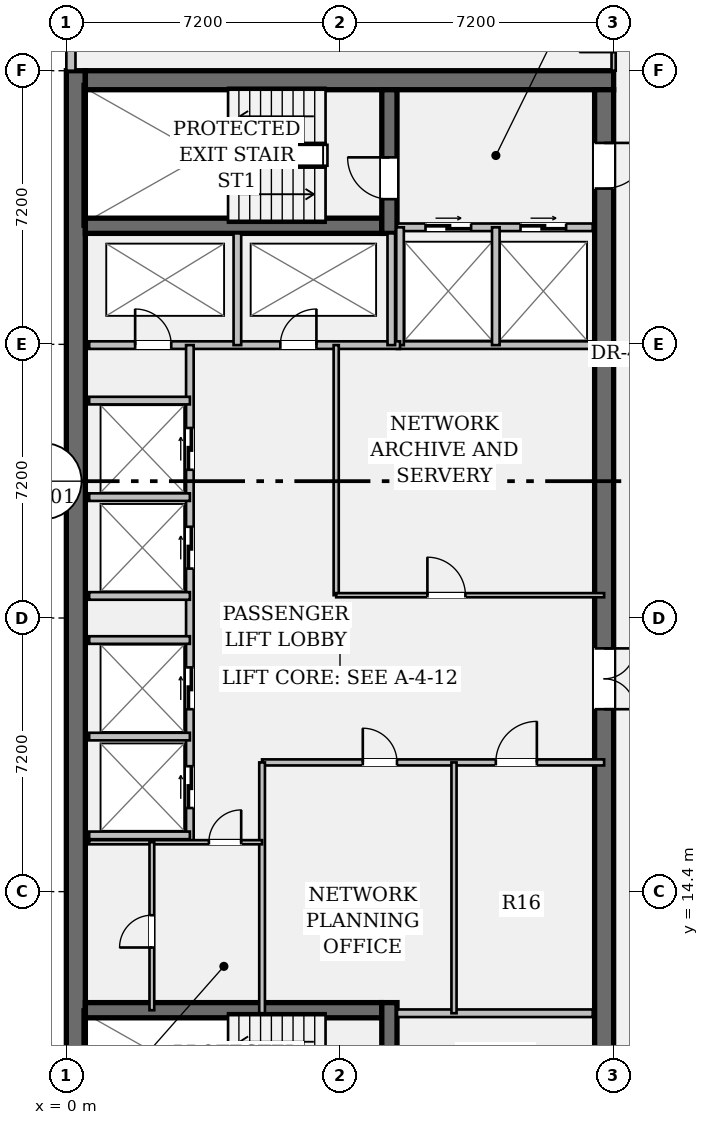
"""IFC4 building model, lengths in metres.
Left out: names, types, materials, properties, quantities, classifications, styles, units other than length and angle.
Written with IfcOpenShell. Run it as: python <this file> out.ifc"""

import sys

from ifc_helpers import new_model, si_unit, direction, frame, frame_2d, origin, place, context, subcontext, project, spatial, rectangle, extrude, element, fill, save


model = new_model("IFC4")
c1 = context("Model", 3, precision=1e-05, world=origin(), true_north=direction((0.0, 1.0)))
c2 = subcontext(c1, "Body", "Model", "MODEL_VIEW")
j1 = project(units=[si_unit("LENGTHUNIT", "METRE"), si_unit("PLANEANGLEUNIT", "RADIAN")], contexts=[c1])
p1 = place(None, origin())
s1 = spatial("IfcSite", under=j1, at=p1, CompositionType="ELEMENT")
p2 = place(p1, origin())
s2 = spatial("IfcBuilding", under=s1, at=p2, CompositionType="ELEMENT")
p3 = place(p2, frame((0.0, 0.0, 180.25)))
s3 = spatial("IfcBuildingStorey", under=s2, at=p3, CompositionType="ELEMENT", Elevation=180.25)
p4 = place(p3, frame((0.25, 7.2, 0.0), z_axis=(0.0, 0.0, 1.0), x_axis=(0.0, 1.0, 0.0)))
e1 = element("IfcWall", 1, at=p4, inside=s3, PredefinedType="SHEAR", context=c2, shape_type="SweptSolid", body=[
    extrude(rectangle(XDim=28.8, YDim=0.5, at=frame_2d((14.4, 0.0))), origin(), (0.0, 0.0, 1.0), 3.24),
])
p5 = place(p3, frame((0.5, 35.75, 0.0), z_axis=(0.0, 0.0, 1.0), x_axis=(1.0, 0.0, 0.0)))
e2 = element("IfcWall", 2, at=p5, inside=s3, PredefinedType="SHEAR", context=c2, shape_type="SweptSolid", body=[
    extrude(rectangle(XDim=13.9, YDim=0.5, at=frame_2d((6.95, 0.0))), origin(), (0.0, 0.0, 1.0), 3.24),
])
p6 = place(p3, frame((14.15, 35.5, 0.0), z_axis=(0.0, 0.0, 1.0), x_axis=(0.0, -1.0, 0.0)))
e3 = element("IfcWall", 3, at=p6, inside=s3, PredefinedType="SHEAR", context=c2, shape_type="SweptSolid", body=[
    extrude(rectangle(XDim=27.8, YDim=0.5, at=frame_2d((13.9, 0.0))), origin(), (0.0, 0.0, 1.0), 3.24),
])
p7 = place(p6, frame((1.4, 0.0, 0.0)))
e4 = element("IfcOpeningElement", 4, at=p7, cuts=e3, PredefinedType="OPENING", context=c2, shape_type="SweptSolid", body=[
    extrude(rectangle(XDim=1.2, YDim=2.15, at=frame_2d((0.6, 1.075))), frame((0.0, 0.262, 0.0), z_axis=(0.0, -1.0, 0.0), x_axis=(1.0, 0.0, 0.0)), (0.0, 0.0, 1.0), 0.524),
])
p8 = place(p6, frame((25.35, 0.0, 0.0)))
e5 = element("IfcOpeningElement", 5, at=p8, cuts=e3, PredefinedType="OPENING", context=c2, shape_type="SweptSolid", body=[
    extrude(rectangle(XDim=1.2, YDim=2.15, at=frame_2d((0.6, 1.075))), frame((0.0, 0.262, 0.0), z_axis=(0.0, -1.0, 0.0), x_axis=(1.0, 0.0, 0.0)), (0.0, 0.0, 1.0), 0.524),
])
p9 = place(p6, frame((14.7, 0.0, 0.0)))
e6 = element("IfcOpeningElement", 6, at=p9, cuts=e3, PredefinedType="OPENING", context=c2, shape_type="SweptSolid", body=[
    extrude(rectangle(XDim=1.6, YDim=2.2, at=frame_2d((0.8, 1.1))), frame((0.0, 0.262, 0.0), z_axis=(0.0, -1.0, 0.0), x_axis=(1.0, 0.0, 0.0)), (0.0, 0.0, 1.0), 0.524),
])
for number, where, z_axis, x_axis in (
    (7, (0.5, 31.92, 0.0), (0.0, 0.0, 1.0), (1.0, 0.0, 0.0)),
    (8, (0.5, 11.28, 0.0), (0.0, 0.0, 1.0), (1.0, 0.0, 0.0)),
):
    element("IfcWall", number, at=place(p3, frame(where, z_axis=z_axis, x_axis=x_axis)), inside=s3, PredefinedType="SHEAR", context=c2, shape_type="SweptSolid", body=[
        extrude(rectangle(XDim=7.8, YDim=0.4, at=frame_2d((3.9, 0.0))), origin(), (0.0, 0.0, 1.0), 3.24),
    ])
p10 = place(p3, frame((8.5, 31.72, 0.0), z_axis=(0.0, 0.0, 1.0), x_axis=(0.0, 1.0, 0.0)))
e9 = element("IfcWall", 9, at=p10, inside=s3, PredefinedType="SHEAR", context=c2, shape_type="SweptSolid", body=[
    extrude(rectangle(XDim=3.78, YDim=0.4, at=frame_2d((1.89, 0.0))), origin(), (0.0, 0.0, 1.0), 3.24),
])
p11 = place(p10, frame((0.9, 0.0, 0.0)))
e10 = element("IfcOpeningElement", 10, at=p11, cuts=e9, PredefinedType="OPENING", context=c2, shape_type="SweptSolid", body=[
    extrude(rectangle(XDim=1.1, YDim=2.15, at=frame_2d((0.55, 1.075))), frame((0.0, 0.212, 0.0), z_axis=(0.0, -1.0, 0.0), x_axis=(1.0, 0.0, 0.0)), (0.0, 0.0, 1.0), 0.424),
])
p12 = place(p3, frame((8.5, 7.7, 0.0), z_axis=(0.0, 0.0, 1.0), x_axis=(0.0, 1.0, 0.0)))
e11 = element("IfcWall", 11, at=p12, inside=s3, PredefinedType="SHEAR", context=c2, shape_type="SweptSolid", body=[
    extrude(rectangle(XDim=3.78, YDim=0.4, at=frame_2d((1.89, 0.0))), origin(), (0.0, 0.0, 1.0), 3.24),
])
p13 = place(p12, frame((0.85, 0.0, 0.0)))
e12 = element("IfcOpeningElement", 12, at=p13, cuts=e11, PredefinedType="OPENING", context=c2, shape_type="SweptSolid", body=[
    extrude(rectangle(XDim=1.1, YDim=2.15, at=frame_2d((0.55, 1.075))), frame((0.0, 0.212, 0.0), z_axis=(0.0, -1.0, 0.0), x_axis=(1.0, 0.0, 0.0)), (0.0, 0.0, 1.0), 0.424),
])
p14 = place(p3, frame((0.12, 36.0, 0.0), z_axis=(0.0, 0.0, 1.0), x_axis=(0.0, 1.0, 0.0)))
e13 = element("IfcWall", 13, at=p14, inside=s3, PredefinedType="STANDARD", context=c2, shape_type="SweptSolid", body=[
    extrude(rectangle(XDim=1.13, YDim=0.24, at=frame_2d((0.565, 0.0))), origin(), (0.0, 0.0, 1.0), 3.24),
])
p15 = place(p3, frame((8.7, 31.88, 0.0), z_axis=(0.0, 0.0, 1.0), x_axis=(1.0, 0.0, 0.0)))
e14 = element("IfcWall", 14, at=p15, inside=s3, PredefinedType="PARTITIONING", context=c2, shape_type="SweptSolid", body=[
    extrude(rectangle(XDim=5.15, YDim=0.2, at=frame_2d((2.575, 0.0))), origin(), (0.0, 0.0, 1.0), 3.24),
])
p16 = place(p15, frame((0.75, 0.0, 0.0)))
e15 = element("IfcOpeningElement", 15, at=p16, cuts=e14, PredefinedType="OPENING", context=c2, shape_type="SweptSolid", body=[
    extrude(rectangle(XDim=1.2, YDim=2.2, at=frame_2d((0.6, 1.1))), frame((0.0, 0.112, 0.0), z_axis=(0.0, -1.0, 0.0), x_axis=(1.0, 0.0, 0.0)), (0.0, 0.0, 1.0), 0.224),
])
p17 = place(p15, frame((3.25, 0.0, 0.0)))
e16 = element("IfcOpeningElement", 16, at=p17, cuts=e14, PredefinedType="OPENING", context=c2, shape_type="SweptSolid", body=[
    extrude(rectangle(XDim=1.2, YDim=2.2, at=frame_2d((0.6, 1.1))), frame((0.0, 0.112, 0.0), z_axis=(0.0, -1.0, 0.0), x_axis=(1.0, 0.0, 0.0)), (0.0, 0.0, 1.0), 0.224),
])
for number, where, z_axis, x_axis in (
    (17, (8.7, 11.2, 0.0), (0.0, 0.0, 1.0), (1.0, 0.0, 0.0)),
    (18, (8.7, 28.78, 0.0), (0.0, 0.0, 1.0), (1.0, 0.0, 0.0)),
):
    element("IfcWall", number, at=place(p3, frame(where, z_axis=z_axis, x_axis=x_axis)), inside=s3, PredefinedType="PARTITIONING", context=c2, shape_type="SweptSolid", body=[
        extrude(rectangle(XDim=5.15, YDim=0.2, at=frame_2d((2.575, 0.0))), origin(), (0.0, 0.0, 1.0), 3.24),
    ])
for number, where, z_axis, x_axis in (
    (19, (8.78, 28.78, 0.0), (0.0, 0.0, 1.0), (0.0, 1.0, 0.0)),
    (20, (11.3, 28.78, 0.0), (0.0, 0.0, 1.0), (0.0, 1.0, 0.0)),
):
    element("IfcWall", number, at=place(p3, frame(where, z_axis=z_axis, x_axis=x_axis)), inside=s3, PredefinedType="PARTITIONING", context=c2, shape_type="SweptSolid", body=[
        extrude(rectangle(XDim=3.1, YDim=0.2, at=frame_2d((1.55, 0.0))), origin(), (0.0, 0.0, 1.0), 3.24),
    ])
p18 = place(p3, frame((0.6, 28.78, 0.0), z_axis=(0.0, 0.0, 1.0), x_axis=(1.0, 0.0, 0.0)))
e21 = element("IfcWall", 21, at=p18, inside=s3, PredefinedType="PARTITIONING", context=c2, shape_type="SweptSolid", body=[
    extrude(rectangle(XDim=8.18, YDim=0.2, at=frame_2d((4.09, 0.0))), origin(), (0.0, 0.0, 1.0), 3.24),
])
p19 = place(p18, frame((1.21, 0.0, 0.0)))
e22 = element("IfcOpeningElement", 22, at=p19, cuts=e21, PredefinedType="OPENING", context=c2, shape_type="SweptSolid", body=[
    extrude(rectangle(XDim=0.95, YDim=2.15, at=frame_2d((0.475, 1.075))), frame((0.0, 0.112, 0.0), z_axis=(0.0, -1.0, 0.0), x_axis=(1.0, 0.0, 0.0)), (0.0, 0.0, 1.0), 0.224),
])
p20 = place(p18, frame((5.03, 0.0, 0.0)))
e23 = element("IfcOpeningElement", 23, at=p20, cuts=e21, PredefinedType="OPENING", context=c2, shape_type="SweptSolid", body=[
    extrude(rectangle(XDim=0.95, YDim=2.15, at=frame_2d((0.475, 1.075))), frame((0.0, 0.112, 0.0), z_axis=(0.0, -1.0, 0.0), x_axis=(1.0, 0.0, 0.0)), (0.0, 0.0, 1.0), 0.224),
])
for number, where, z_axis, x_axis in (
    (24, (4.5, 28.78, 0.0), (0.0, 0.0, 1.0), (0.0, 1.0, 0.0)),
    (25, (8.55, 28.78, 0.0), (0.0, 0.0, 1.0), (0.0, 1.0, 0.0)),
):
    element("IfcWall", number, at=place(p3, frame(where, z_axis=z_axis, x_axis=x_axis)), inside=s3, PredefinedType="PARTITIONING", context=c2, shape_type="SweptSolid", body=[
        extrude(rectangle(XDim=2.94, YDim=0.2, at=frame_2d((1.47, 0.0))), origin(), (0.0, 0.0, 1.0), 3.24),
    ])
p21 = place(p3, frame((3.25, 15.7, 0.0), z_axis=(0.0, 0.0, 1.0), x_axis=(0.0, 1.0, 0.0)))
e26 = element("IfcWall", 26, at=p21, inside=s3, PredefinedType="PARTITIONING", context=c2, shape_type="SweptSolid", body=[
    extrude(rectangle(XDim=13.08, YDim=0.2, at=frame_2d((6.54, 0.0))), origin(), (0.0, 0.0, 1.0), 3.24),
])
p22 = place(p21, frame((0.9, 0.0, 0.0)))
e27 = element("IfcOpeningElement", 27, at=p22, cuts=e26, PredefinedType="OPENING", context=c2, shape_type="SweptSolid", body=[
    extrude(rectangle(XDim=1.1, YDim=2.2, at=frame_2d((0.55, 1.1))), frame((0.0, 0.112, 0.0), z_axis=(0.0, -1.0, 0.0), x_axis=(1.0, 0.0, 0.0)), (0.0, 0.0, 1.0), 0.224),
])
p23 = place(p21, frame((3.5, 0.0, 0.0)))
e28 = element("IfcOpeningElement", 28, at=p23, cuts=e26, PredefinedType="OPENING", context=c2, shape_type="SweptSolid", body=[
    extrude(rectangle(XDim=1.1, YDim=2.2, at=frame_2d((0.55, 1.1))), frame((0.0, 0.112, 0.0), z_axis=(0.0, -1.0, 0.0), x_axis=(1.0, 0.0, 0.0)), (0.0, 0.0, 1.0), 0.224),
])
p24 = place(p21, frame((7.2, 0.0, 0.0)))
e29 = element("IfcOpeningElement", 29, at=p24, cuts=e26, PredefinedType="OPENING", context=c2, shape_type="SweptSolid", body=[
    extrude(rectangle(XDim=1.1, YDim=2.2, at=frame_2d((0.55, 1.1))), frame((0.0, 0.112, 0.0), z_axis=(0.0, -1.0, 0.0), x_axis=(1.0, 0.0, 0.0)), (0.0, 0.0, 1.0), 0.224),
])
p25 = place(p21, frame((9.8, 0.0, 0.0)))
e30 = element("IfcOpeningElement", 30, at=p25, cuts=e26, PredefinedType="OPENING", context=c2, shape_type="SweptSolid", body=[
    extrude(rectangle(XDim=1.1, YDim=2.2, at=frame_2d((0.55, 1.1))), frame((0.0, 0.112, 0.0), z_axis=(0.0, -1.0, 0.0), x_axis=(1.0, 0.0, 0.0)), (0.0, 0.0, 1.0), 0.224),
])
for number, where, z_axis, x_axis in (
    (31, (0.6, 15.88, 0.0), (0.0, 0.0, 1.0), (1.0, 0.0, 0.0)),
    (32, (0.6, 18.48, 0.0), (0.0, 0.0, 1.0), (1.0, 0.0, 0.0)),
    (33, (0.6, 22.18, 0.0), (0.0, 0.0, 1.0), (1.0, 0.0, 0.0)),
    (34, (0.6, 24.78, 0.0), (0.0, 0.0, 1.0), (1.0, 0.0, 0.0)),
    (35, (0.6, 21.02, 0.0), (0.0, 0.0, 1.0), (1.0, 0.0, 0.0)),
    (36, (0.6, 27.32, 0.0), (0.0, 0.0, 1.0), (1.0, 0.0, 0.0)),
):
    element("IfcWall", number, at=place(p3, frame(where, z_axis=z_axis, x_axis=x_axis)), inside=s3, PredefinedType="PARTITIONING", context=c2, shape_type="SweptSolid", body=[
        extrude(rectangle(XDim=2.65, YDim=0.2, at=frame_2d((1.325, 0.0))), origin(), (0.0, 0.0, 1.0), 3.24),
    ])
p26 = place(p3, frame((7.1, 22.2, 0.0), z_axis=(0.0, 0.0, 1.0), x_axis=(0.0, 1.0, 0.0)))
e37 = element("IfcWall", 37, at=p26, inside=s3, PredefinedType="PARTITIONING", context=c2, shape_type="SweptSolid", body=[
    extrude(rectangle(XDim=6.58, YDim=0.135, at=frame_2d((3.29, 0.0))), origin(), (0.0, 0.0, 1.0), 3.24),
])
p27 = place(p3, frame((7.1, 22.2, 0.0), z_axis=(0.0, 0.0, 1.0), x_axis=(1.0, 0.0, 0.0)))
e38 = element("IfcWall", 38, at=p27, inside=s3, PredefinedType="PARTITIONING", context=c2, shape_type="SweptSolid", body=[
    extrude(rectangle(XDim=7.05, YDim=0.11, at=frame_2d((3.525, 0.0))), origin(), (0.0, 0.0, 1.0), 3.24),
])
p28 = place(p27, frame((2.4, 0.0, 0.0)))
e39 = element("IfcOpeningElement", 39, at=p28, cuts=e38, PredefinedType="OPENING", context=c2, shape_type="SweptSolid", body=[
    extrude(rectangle(XDim=1.0, YDim=2.15, at=frame_2d((0.5, 1.075))), frame((0.0, 0.067, 0.0), z_axis=(0.0, -1.0, 0.0), x_axis=(1.0, 0.0, 0.0)), (0.0, 0.0, 1.0), 0.134),
])
p29 = place(p3, frame((5.15, 17.8, 0.0), z_axis=(0.0, 0.0, 1.0), x_axis=(1.0, 0.0, 0.0)))
e40 = element("IfcWall", 40, at=p29, inside=s3, PredefinedType="PARTITIONING", context=c2, shape_type="SweptSolid", body=[
    extrude(rectangle(XDim=9.0, YDim=0.16, at=frame_2d((4.5, 0.0))), origin(), (0.0, 0.0, 1.0), 3.24),
])
p30 = place(p29, frame((2.65, 0.0, 0.0)))
e41 = element("IfcOpeningElement", 41, at=p30, cuts=e40, PredefinedType="OPENING", context=c2, shape_type="SweptSolid", body=[
    extrude(rectangle(XDim=0.9, YDim=2.15, at=frame_2d((0.45, 1.075))), frame((0.0, 0.092, 0.0), z_axis=(0.0, -1.0, 0.0), x_axis=(1.0, 0.0, 0.0)), (0.0, 0.0, 1.0), 0.184),
])
p31 = place(p29, frame((6.15, 0.0, 0.0)))
e42 = element("IfcOpeningElement", 42, at=p31, cuts=e40, PredefinedType="OPENING", context=c2, shape_type="SweptSolid", body=[
    extrude(rectangle(XDim=1.08, YDim=2.15, at=frame_2d((0.54, 1.075))), frame((0.0, 0.092, 0.0), z_axis=(0.0, -1.0, 0.0), x_axis=(1.0, 0.0, 0.0)), (0.0, 0.0, 1.0), 0.184),
])
p32 = place(p3, frame((5.15, 11.2, 0.0), z_axis=(0.0, 0.0, 1.0), x_axis=(0.0, 1.0, 0.0)))
e43 = element("IfcWall", 43, at=p32, inside=s3, PredefinedType="PARTITIONING", context=c2, shape_type="SweptSolid", body=[
    extrude(rectangle(XDim=6.6, YDim=0.15, at=frame_2d((3.3, 0.0))), origin(), (0.0, 0.0, 1.0), 3.24),
])
p33 = place(p3, frame((10.2, 11.2, 0.0), z_axis=(0.0, 0.0, 1.0), x_axis=(0.0, 1.0, 0.0)))
e44 = element("IfcWall", 44, at=p33, inside=s3, PredefinedType="PARTITIONING", context=c2, shape_type="SweptSolid", body=[
    extrude(rectangle(XDim=6.6, YDim=0.135, at=frame_2d((3.3, 0.0))), origin(), (0.0, 0.0, 1.0), 3.24),
])
p34 = place(p3, frame((0.6, 15.7, 0.0), z_axis=(0.0, 0.0, 1.0), x_axis=(1.0, 0.0, 0.0)))
e45 = element("IfcWall", 45, at=p34, inside=s3, PredefinedType="PARTITIONING", context=c2, shape_type="SweptSolid", body=[
    extrude(rectangle(XDim=4.55, YDim=0.11, at=frame_2d((2.275, 0.0))), origin(), (0.0, 0.0, 1.0), 3.24),
])
p35 = place(p34, frame((3.15, 0.0, 0.0)))
e46 = element("IfcOpeningElement", 46, at=p35, cuts=e45, PredefinedType="OPENING", context=c2, shape_type="SweptSolid", body=[
    extrude(rectangle(XDim=0.85, YDim=2.15, at=frame_2d((0.425, 1.075))), frame((0.0, 0.067, 0.0), z_axis=(0.0, -1.0, 0.0), x_axis=(1.0, 0.0, 0.0)), (0.0, 0.0, 1.0), 0.134),
])
p36 = place(p3, frame((2.25, 11.28, 0.0), z_axis=(0.0, 0.0, 1.0), x_axis=(0.0, 1.0, 0.0)))
e47 = element("IfcWall", 47, at=p36, inside=s3, PredefinedType="PARTITIONING", context=c2, shape_type="SweptSolid", body=[
    extrude(rectangle(XDim=4.42, YDim=0.125, at=frame_2d((2.21, 0.0))), origin(), (0.0, 0.0, 1.0), 3.24),
])
p37 = place(p36, frame((1.65, 0.0, 0.0)))
e48 = element("IfcOpeningElement", 48, at=p37, cuts=e47, PredefinedType="OPENING", context=c2, shape_type="SweptSolid", body=[
    extrude(rectangle(XDim=0.85, YDim=2.15, at=frame_2d((0.425, 1.075))), frame((0.0, 0.074, 0.0), z_axis=(0.0, -1.0, 0.0), x_axis=(1.0, 0.0, 0.0)), (0.0, 0.0, 1.0), 0.149),
])
p38 = place(p3, frame((14.4, 36.0, 0.0), z_axis=(0.0, 0.0, 1.0), x_axis=(0.0, 1.0, 0.0)))
e49 = element("IfcWall", 49, at=p38, inside=s3, PredefinedType="PARTITIONING", context=c2, shape_type="SweptSolid", body=[
    extrude(rectangle(XDim=3.88, YDim=0.11, at=frame_2d((1.94, 0.0))), origin(), (0.0, 0.0, 1.0), 2.603),
])
p39 = place(p38, frame((0.49, 0.0, 0.0)))
e50 = element("IfcOpeningElement", 50, at=p39, cuts=e49, PredefinedType="OPENING", context=c2, shape_type="SweptSolid", body=[
    extrude(rectangle(XDim=0.9, YDim=2.15, at=frame_2d((0.45, 1.075))), frame((0.0, 0.067, 0.0), z_axis=(0.0, -1.0, 0.0), x_axis=(1.0, 0.0, 0.0)), (0.0, 0.0, 1.0), 0.134),
])
p40 = place(p11, origin())
e51 = element("IfcDoor", 51, at=p40, inside=s3, OperationType="SINGLE_SWING_RIGHT", PredefinedType="DOOR", context=c2, shape_type="SweptSolid", body=[
    extrude(rectangle(XDim=1.1, YDim=2.15, at=frame_2d((0.55, 1.075))), frame((0.0, 0.025, 0.0), z_axis=(0.0, -1.0, 0.0), x_axis=(1.0, 0.0, 0.0)), (0.0, 0.0, 1.0), 0.05),
])
fill(e10, e51)
p41 = place(p7, origin())
e52 = element("IfcDoor", 52, at=p41, inside=s3, OperationType="SINGLE_SWING_LEFT", PredefinedType="DOOR", context=c2, shape_type="SweptSolid", body=[
    extrude(rectangle(XDim=1.2, YDim=2.15, at=frame_2d((0.6, 1.075))), frame((0.0, 0.025, 0.0), z_axis=(0.0, -1.0, 0.0), x_axis=(1.0, 0.0, 0.0)), (0.0, 0.0, 1.0), 0.05),
])
fill(e4, e52)
p42 = place(p16, origin())
e53 = element("IfcDoor", 53, at=p42, inside=s3, OperationType="DOUBLE_DOOR_SLIDING", PredefinedType="DOOR", context=c2, shape_type="SweptSolid", body=[
    extrude(rectangle(XDim=1.2, YDim=2.2, at=frame_2d((0.6, 1.1))), frame((0.0, 0.025, 0.0), z_axis=(0.0, -1.0, 0.0), x_axis=(1.0, 0.0, 0.0)), (0.0, 0.0, 1.0), 0.05),
])
fill(e15, e53)
p43 = place(p17, origin())
e54 = element("IfcDoor", 54, at=p43, inside=s3, OperationType="DOUBLE_DOOR_SLIDING", PredefinedType="DOOR", context=c2, shape_type="SweptSolid", body=[
    extrude(rectangle(XDim=1.2, YDim=2.2, at=frame_2d((0.6, 1.1))), frame((0.0, 0.025, 0.0), z_axis=(0.0, -1.0, 0.0), x_axis=(1.0, 0.0, 0.0)), (0.0, 0.0, 1.0), 0.05),
])
fill(e16, e54)
p44 = place(p19, origin())
e55 = element("IfcDoor", 55, at=p44, inside=s3, OperationType="SINGLE_SWING_LEFT", PredefinedType="DOOR", context=c2, shape_type="SweptSolid", body=[
    extrude(rectangle(XDim=0.95, YDim=2.15, at=frame_2d((0.475, 1.075))), frame((0.0, 0.025, 0.0), z_axis=(0.0, -1.0, 0.0), x_axis=(1.0, 0.0, 0.0)), (0.0, 0.0, 1.0), 0.05),
])
fill(e22, e55)
p45 = place(p20, origin())
e56 = element("IfcDoor", 56, at=p45, inside=s3, OperationType="SINGLE_SWING_RIGHT", PredefinedType="DOOR", context=c2, shape_type="SweptSolid", body=[
    extrude(rectangle(XDim=0.95, YDim=2.15, at=frame_2d((0.475, 1.075))), frame((0.0, 0.025, 0.0), z_axis=(0.0, -1.0, 0.0), x_axis=(1.0, 0.0, 0.0)), (0.0, 0.0, 1.0), 0.05),
])
fill(e23, e56)
p46 = place(p9, origin())
e57 = element("IfcDoor", 57, at=p46, inside=s3, OperationType="DOUBLE_DOOR_SINGLE_SWING", PredefinedType="DOOR", context=c2, shape_type="SweptSolid", body=[
    extrude(rectangle(XDim=1.6, YDim=2.2, at=frame_2d((0.8, 1.1))), frame((0.0, 0.025, 0.0), z_axis=(0.0, -1.0, 0.0), x_axis=(1.0, 0.0, 0.0)), (0.0, 0.0, 1.0), 0.05),
])
fill(e6, e57)
p47 = place(p22, origin())
e58 = element("IfcDoor", 58, at=p47, inside=s3, OperationType="DOUBLE_DOOR_SLIDING", PredefinedType="DOOR", context=c2, shape_type="SweptSolid", body=[
    extrude(rectangle(XDim=1.1, YDim=2.2, at=frame_2d((0.55, 1.1))), frame((0.0, 0.025, 0.0), z_axis=(0.0, -1.0, 0.0), x_axis=(1.0, 0.0, 0.0)), (0.0, 0.0, 1.0), 0.05),
])
fill(e27, e58)
p48 = place(p23, origin())
e59 = element("IfcDoor", 59, at=p48, inside=s3, OperationType="DOUBLE_DOOR_SLIDING", PredefinedType="DOOR", context=c2, shape_type="SweptSolid", body=[
    extrude(rectangle(XDim=1.1, YDim=2.2, at=frame_2d((0.55, 1.1))), frame((0.0, 0.025, 0.0), z_axis=(0.0, -1.0, 0.0), x_axis=(1.0, 0.0, 0.0)), (0.0, 0.0, 1.0), 0.05),
])
fill(e28, e59)
p49 = place(p24, origin())
e60 = element("IfcDoor", 60, at=p49, inside=s3, OperationType="DOUBLE_DOOR_SLIDING", PredefinedType="DOOR", context=c2, shape_type="SweptSolid", body=[
    extrude(rectangle(XDim=1.1, YDim=2.2, at=frame_2d((0.55, 1.1))), frame((0.0, 0.025, 0.0), z_axis=(0.0, -1.0, 0.0), x_axis=(1.0, 0.0, 0.0)), (0.0, 0.0, 1.0), 0.05),
])
fill(e29, e60)
p50 = place(p25, origin())
e61 = element("IfcDoor", 61, at=p50, inside=s3, OperationType="DOUBLE_DOOR_SLIDING", PredefinedType="DOOR", context=c2, shape_type="SweptSolid", body=[
    extrude(rectangle(XDim=1.1, YDim=2.2, at=frame_2d((0.55, 1.1))), frame((0.0, 0.025, 0.0), z_axis=(0.0, -1.0, 0.0), x_axis=(1.0, 0.0, 0.0)), (0.0, 0.0, 1.0), 0.05),
])
fill(e30, e61)
p51 = place(p28, origin())
e62 = element("IfcDoor", 62, at=p51, inside=s3, OperationType="SINGLE_SWING_LEFT", PredefinedType="DOOR", context=c2, shape_type="SweptSolid", body=[
    extrude(rectangle(XDim=1.0, YDim=2.15, at=frame_2d((0.5, 1.075))), frame((0.0, 0.025, 0.0), z_axis=(0.0, -1.0, 0.0), x_axis=(1.0, 0.0, 0.0)), (0.0, 0.0, 1.0), 0.05),
])
fill(e39, e62)
p52 = place(p30, origin())
e63 = element("IfcDoor", 63, at=p52, inside=s3, OperationType="SINGLE_SWING_LEFT", PredefinedType="DOOR", context=c2, shape_type="SweptSolid", body=[
    extrude(rectangle(XDim=0.9, YDim=2.15, at=frame_2d((0.45, 1.075))), frame((0.0, 0.025, 0.0), z_axis=(0.0, -1.0, 0.0), x_axis=(1.0, 0.0, 0.0)), (0.0, 0.0, 1.0), 0.05),
])
fill(e41, e63)
p53 = place(p31, origin())
e64 = element("IfcDoor", 64, at=p53, inside=s3, OperationType="SINGLE_SWING_RIGHT", PredefinedType="DOOR", context=c2, shape_type="SweptSolid", body=[
    extrude(rectangle(XDim=1.08, YDim=2.15, at=frame_2d((0.54, 1.075))), frame((0.0, 0.025, 0.0), z_axis=(0.0, -1.0, 0.0), x_axis=(1.0, 0.0, 0.0)), (0.0, 0.0, 1.0), 0.05),
])
fill(e42, e64)
p54 = place(p35, origin())
e65 = element("IfcDoor", 65, at=p54, inside=s3, OperationType="SINGLE_SWING_RIGHT", PredefinedType="DOOR", context=c2, shape_type="SweptSolid", body=[
    extrude(rectangle(XDim=0.85, YDim=2.15, at=frame_2d((0.425, 1.075))), frame((0.0, 0.025, 0.0), z_axis=(0.0, -1.0, 0.0), x_axis=(1.0, 0.0, 0.0)), (0.0, 0.0, 1.0), 0.05),
])
fill(e46, e65)
p55 = place(p37, origin())
e66 = element("IfcDoor", 66, at=p55, inside=s3, OperationType="SINGLE_SWING_LEFT", PredefinedType="DOOR", context=c2, shape_type="SweptSolid", body=[
    extrude(rectangle(XDim=0.85, YDim=2.15, at=frame_2d((0.425, 1.075))), frame((0.0, 0.025, 0.0), z_axis=(0.0, -1.0, 0.0), x_axis=(1.0, 0.0, 0.0)), (0.0, 0.0, 1.0), 0.05),
])
fill(e48, e66)
save(model, sys.argv[1])
